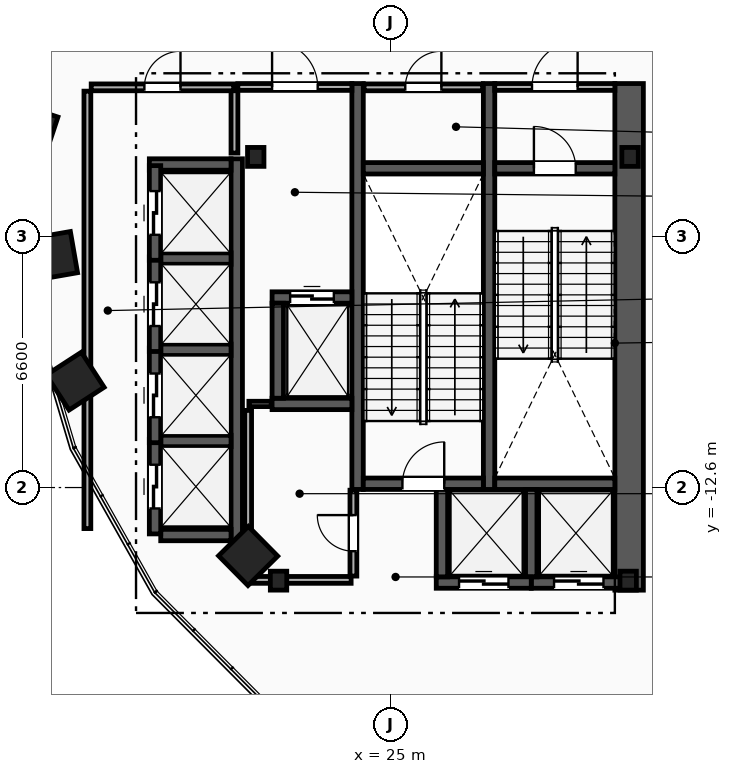
"""IFC4 building model, lengths in metres.
Left out: names, types, materials, properties, quantities, classifications, styles, units other than length and angle.
Written with IfcOpenShell. Run it as: python <this file> out.ifc"""

import sys

from ifc_helpers import new_model, si_unit, direction, frame, frame_2d, origin, origin_2d, place, context, subcontext, project, spatial, rectangle, i_section, extrude, element, fill, save


model = new_model("IFC4")
c1 = context("Model", 3, precision=1e-05, world=origin(), true_north=direction((0.0, 1.0)))
c2 = subcontext(c1, "Body", "Model", "MODEL_VIEW")
j1 = project(units=[si_unit("LENGTHUNIT", "METRE"), si_unit("PLANEANGLEUNIT", "RADIAN")], contexts=[c1])
p1 = place(None, origin())
s1 = spatial("IfcSite", under=j1, at=p1, CompositionType="ELEMENT")
p2 = place(p1, origin())
s2 = spatial("IfcBuilding", under=s1, at=p2, CompositionType="ELEMENT")
p3 = place(p2, frame((0.0, 0.0, 132.2)))
s3 = spatial("IfcBuildingStorey", under=s2, at=p3, CompositionType="ELEMENT", Elevation=132.2)
for number, where, z_axis, x_axis in (
    (1, (31.3, -3.9, 0.0), (0.0, 0.0, 1.0), (1.0, 0.0, 0.0)),
    (2, (21.45, -3.9, 0.0), (0.0, 0.0, 1.0), (1.0, 0.0, 0.0)),
    (3, (22.05, -15.05, 0.0), (0.0, 0.0, 1.0), (1.0, 0.0, 0.0)),
    (4, (31.25, -15.05, 0.0), (0.0, 0.0, 1.0), (1.0, 0.0, 0.0)),
):
    element("IfcColumn", number, at=place(p3, frame(where, z_axis=z_axis, x_axis=x_axis)), inside=s3, PredefinedType="COLUMN", context=c2, shape_type="SweptSolid", body=[
        extrude(i_section(OverallWidth=0.432, OverallDepth=0.498, WebThickness=0.056, FlangeThickness=0.089, FilletRadius=0.018, at=origin_2d()), origin(), (0.0, 0.0, 1.0), 4.6),
    ])
for number, where, z_axis, x_axis in (
    (5, (15.55, -3.2, 0.0), (0.0, 0.0, 1.0), (-0.315, -0.949, 0.0)),
    (6, (16.125, -6.5, 0.0), (0.0, 0.0, 1.0), (0.172, -0.985, 0.0)),
    (7, (16.7, -9.8, 0.0), (0.0, 0.0, 1.0), (0.544, -0.839, 0.0)),
    (8, (21.25, -14.4, 0.0), (0.0, 0.0, 1.0), (0.703, -0.711, 0.0)),
):
    element("IfcColumn", number, at=place(p3, frame(where, z_axis=z_axis, x_axis=x_axis)), inside=s3, PredefinedType="COLUMN", context=c2, shape_type="SweptSolid", body=[
        extrude(rectangle(XDim=1.1, YDim=1.1, at=origin_2d()), origin(), (0.0, 0.0, 1.0), 4.6),
    ])
p4 = place(p3, frame((31.275, -15.3, 0.0), z_axis=(0.0, 0.0, 1.0), x_axis=(0.0, 1.0, 0.0)))
e9 = element("IfcWall", 9, at=p4, inside=s3, PredefinedType="SHEAR", context=c2, shape_type="SweptSolid", body=[
    extrude(rectangle(XDim=13.33, YDim=0.75, at=frame_2d((6.665, 0.0))), origin(), (0.0, 0.0, 1.0), 4.36),
])
for number, where, z_axis, x_axis in (
    (10, (27.59, -12.65, 0.0), (0.0, 0.0, 1.0), (0.0, 1.0, 0.0)),
    (11, (24.13, -12.65, 0.0), (0.0, 0.0, 1.0), (0.0, 1.0, 0.0)),
):
    element("IfcWall", number, at=place(p3, frame(where, z_axis=z_axis, x_axis=x_axis)), inside=s3, PredefinedType="SHEAR", context=c2, shape_type="SweptSolid", body=[
        extrude(rectangle(XDim=10.68, YDim=0.3, at=frame_2d((5.34, 0.0))), origin(), (0.0, 0.0, 1.0), 4.36),
    ])
p5 = place(p3, frame((27.74, -4.2, 0.0), z_axis=(0.0, 0.0, 1.0), x_axis=(1.0, 0.0, 0.0)))
e12 = element("IfcWall", 12, at=p5, inside=s3, PredefinedType="SHEAR", context=c2, shape_type="SweptSolid", body=[
    extrude(rectangle(XDim=3.16, YDim=0.3, at=frame_2d((1.58, 0.0))), origin(), (0.0, 0.0, 1.0), 4.36),
])
p6 = place(p5, frame((1.03, 0.0, 0.0)))
e13 = element("IfcOpeningElement", 13, at=p6, cuts=e12, PredefinedType="OPENING", context=c2, shape_type="SweptSolid", body=[
    extrude(rectangle(XDim=1.1, YDim=2.15, at=frame_2d((0.55, 1.075))), frame((0.0, 0.16, 0.0), z_axis=(0.0, -1.0, 0.0), x_axis=(1.0, 0.0, 0.0)), (0.0, 0.0, 1.0), 0.32),
])
p7 = place(p3, frame((27.74, -12.5, 0.0), z_axis=(0.0, 0.0, 1.0), x_axis=(1.0, 0.0, 0.0)))
e14 = element("IfcWall", 14, at=p7, inside=s3, PredefinedType="SHEAR", context=c2, shape_type="SweptSolid", body=[
    extrude(rectangle(XDim=3.16, YDim=0.3, at=frame_2d((1.58, 0.0))), origin(), (0.0, 0.0, 1.0), 4.36),
])
p8 = place(p3, frame((24.28, -12.5, 0.0), z_axis=(0.0, 0.0, 1.0), x_axis=(1.0, 0.0, 0.0)))
e15 = element("IfcWall", 15, at=p8, inside=s3, PredefinedType="SHEAR", context=c2, shape_type="SweptSolid", body=[
    extrude(rectangle(XDim=3.16, YDim=0.3, at=frame_2d((1.58, 0.0))), origin(), (0.0, 0.0, 1.0), 4.36),
])
p9 = place(p8, frame((1.03, 0.0, 0.0)))
e16 = element("IfcOpeningElement", 16, at=p9, cuts=e15, PredefinedType="OPENING", context=c2, shape_type="SweptSolid", body=[
    extrude(rectangle(XDim=1.1, YDim=2.15, at=frame_2d((0.55, 1.075))), frame((0.0, 0.16, 0.0), z_axis=(0.0, -1.0, 0.0), x_axis=(1.0, 0.0, 0.0)), (0.0, 0.0, 1.0), 0.32),
])
p10 = place(p3, frame((24.28, -4.2, 0.0), z_axis=(0.0, 0.0, 1.0), x_axis=(1.0, 0.0, 0.0)))
e17 = element("IfcWall", 17, at=p10, inside=s3, PredefinedType="SHEAR", context=c2, shape_type="SweptSolid", body=[
    extrude(rectangle(XDim=3.16, YDim=0.3, at=frame_2d((1.58, 0.0))), origin(), (0.0, 0.0, 1.0), 4.36),
])
p11 = place(p3, frame((20.89, -3.8, 0.0), z_axis=(0.0, 0.0, 1.0), x_axis=(0.0, 1.0, 0.0)))
e18 = element("IfcWall", 18, at=p11, inside=s3, PredefinedType="PARTITIONING", context=c2, shape_type="SweptSolid", body=[
    extrude(rectangle(XDim=1.65, YDim=0.18, at=frame_2d((0.825, 0.0))), origin(), (0.0, 0.0, 1.0), 4.36),
])
p12 = place(p3, frame((20.98, -2.06, 0.0), z_axis=(0.0, 0.0, 1.0), x_axis=(1.0, 0.0, 0.0)))
e19 = element("IfcWall", 19, at=p12, inside=s3, PredefinedType="PARTITIONING", context=c2, shape_type="SweptSolid", body=[
    extrude(rectangle(XDim=3.0, YDim=0.18, at=frame_2d((1.5, 0.0))), origin(), (0.0, 0.0, 1.0), 4.36),
])
p13 = place(p12, frame((0.9, 0.0, 0.0)))
e20 = element("IfcOpeningElement", 20, at=p13, cuts=e19, PredefinedType="OPENING", context=c2, shape_type="SweptSolid", body=[
    extrude(rectangle(XDim=1.2, YDim=2.15, at=frame_2d((0.6, 1.075))), frame((0.0, 0.1, 0.0), z_axis=(0.0, -1.0, 0.0), x_axis=(1.0, 0.0, 0.0)), (0.0, 0.0, 1.0), 0.2),
])
p14 = place(p3, frame((27.74, -2.06, 0.0), z_axis=(0.0, 0.0, 1.0), x_axis=(1.0, 0.0, 0.0)))
e21 = element("IfcWall", 21, at=p14, inside=s3, PredefinedType="PARTITIONING", context=c2, shape_type="SweptSolid", body=[
    extrude(rectangle(XDim=3.16, YDim=0.18, at=frame_2d((1.58, 0.0))), origin(), (0.0, 0.0, 1.0), 4.36),
])
p15 = place(p14, frame((0.98, 0.0, 0.0)))
e22 = element("IfcOpeningElement", 22, at=p15, cuts=e21, PredefinedType="OPENING", context=c2, shape_type="SweptSolid", body=[
    extrude(rectangle(XDim=1.2, YDim=2.15, at=frame_2d((0.6, 1.075))), frame((0.0, 0.1, 0.0), z_axis=(0.0, -1.0, 0.0), x_axis=(1.0, 0.0, 0.0)), (0.0, 0.0, 1.0), 0.2),
])
p16 = place(p3, frame((21.88, -7.6, 0.0), z_axis=(0.0, 0.0, 1.0), x_axis=(1.0, 0.0, 0.0)))
e23 = element("IfcWall", 23, at=p16, inside=s3, PredefinedType="SHEAR", context=c2, shape_type="SweptSolid", body=[
    extrude(rectangle(XDim=2.1, YDim=0.3, at=frame_2d((1.05, 0.0))), origin(), (0.0, 0.0, 1.0), 4.36),
])
p17 = place(p16, frame((0.475, 0.0, 0.0)))
e24 = element("IfcOpeningElement", 24, at=p17, cuts=e23, PredefinedType="OPENING", context=c2, shape_type="SweptSolid", body=[
    extrude(rectangle(XDim=1.15, YDim=2.2, at=frame_2d((0.575, 1.1))), frame((0.0, 0.16, 0.0), z_axis=(0.0, -1.0, 0.0), x_axis=(1.0, 0.0, 0.0)), (0.0, 0.0, 1.0), 0.32),
])
p18 = place(p3, frame((21.88, -10.4, 0.0), z_axis=(0.0, 0.0, 1.0), x_axis=(1.0, 0.0, 0.0)))
e25 = element("IfcWall", 25, at=p18, inside=s3, PredefinedType="SHEAR", context=c2, shape_type="SweptSolid", body=[
    extrude(rectangle(XDim=2.1, YDim=0.3, at=frame_2d((1.05, 0.0))), origin(), (0.0, 0.0, 1.0), 4.36),
])
p19 = place(p3, frame((22.03, -10.25, 0.0), z_axis=(0.0, 0.0, 1.0), x_axis=(0.0, 1.0, 0.0)))
e26 = element("IfcWall", 26, at=p19, inside=s3, PredefinedType="SHEAR", context=c2, shape_type="SweptSolid", body=[
    extrude(rectangle(XDim=2.5, YDim=0.3, at=frame_2d((1.25, 0.0))), origin(), (0.0, 0.0, 1.0), 4.36),
])
p20 = place(p3, frame((28.7, -15.1, 0.0), z_axis=(0.0, 0.0, 1.0), x_axis=(1.0, 0.0, 0.0)))
e27 = element("IfcWall", 27, at=p20, inside=s3, PredefinedType="SHEAR", context=c2, shape_type="SweptSolid", body=[
    extrude(rectangle(XDim=2.5, YDim=0.3, at=frame_2d((1.25, 0.0))), origin(), (0.0, 0.0, 1.0), 4.36),
])
p21 = place(p20, frame((0.6, 0.0, 0.0)))
e28 = element("IfcOpeningElement", 28, at=p21, cuts=e27, PredefinedType="OPENING", context=c2, shape_type="SweptSolid", body=[
    extrude(rectangle(XDim=1.3, YDim=2.2, at=frame_2d((0.65, 1.1))), frame((0.0, 0.16, 0.0), z_axis=(0.0, -1.0, 0.0), x_axis=(1.0, 0.0, 0.0)), (0.0, 0.0, 1.0), 0.32),
])
p22 = place(p3, frame((28.7, -14.95, 0.0), z_axis=(0.0, 0.0, 1.0), x_axis=(0.0, 1.0, 0.0)))
e29 = element("IfcWall", 29, at=p22, inside=s3, PredefinedType="SHEAR", context=c2, shape_type="SweptSolid", body=[
    extrude(rectangle(XDim=2.3, YDim=0.3, at=frame_2d((1.15, 0.0))), origin(), (0.0, 0.0, 1.0), 4.36),
])
p23 = place(p3, frame((26.2, -15.1, 0.0), z_axis=(0.0, 0.0, 1.0), x_axis=(1.0, 0.0, 0.0)))
e30 = element("IfcWall", 30, at=p23, inside=s3, PredefinedType="SHEAR", context=c2, shape_type="SweptSolid", body=[
    extrude(rectangle(XDim=2.5, YDim=0.3, at=frame_2d((1.25, 0.0))), origin(), (0.0, 0.0, 1.0), 4.36),
])
p24 = place(p23, frame((0.6, 0.0, 0.0)))
e31 = element("IfcOpeningElement", 31, at=p24, cuts=e30, PredefinedType="OPENING", context=c2, shape_type="SweptSolid", body=[
    extrude(rectangle(XDim=1.3, YDim=2.2, at=frame_2d((0.65, 1.1))), frame((0.0, 0.16, 0.0), z_axis=(0.0, -1.0, 0.0), x_axis=(1.0, 0.0, 0.0)), (0.0, 0.0, 1.0), 0.32),
])
p25 = place(p3, frame((26.35, -14.95, 0.0), z_axis=(0.0, 0.0, 1.0), x_axis=(0.0, 1.0, 0.0)))
e32 = element("IfcWall", 32, at=p25, inside=s3, PredefinedType="SHEAR", context=c2, shape_type="SweptSolid", body=[
    extrude(rectangle(XDim=2.3, YDim=0.3, at=frame_2d((1.15, 0.0))), origin(), (0.0, 0.0, 1.0), 4.36),
])
p26 = place(p3, frame((20.95, -14.0, 0.0), z_axis=(0.0, 0.0, 1.0), x_axis=(0.0, 1.0, 0.0)))
e33 = element("IfcWall", 33, at=p26, inside=s3, PredefinedType="SHEAR", context=c2, shape_type="SweptSolid", body=[
    extrude(rectangle(XDim=10.05, YDim=0.3, at=frame_2d((5.025, 0.0))), origin(), (0.0, 0.0, 1.0), 4.36),
])
p27 = place(p3, frame((18.95, -13.85, 0.0), z_axis=(0.0, 0.0, 1.0), x_axis=(1.0, 0.0, 0.0)))
e34 = element("IfcWall", 34, at=p27, inside=s3, PredefinedType="SHEAR", context=c2, shape_type="SweptSolid", body=[
    extrude(rectangle(XDim=1.85, YDim=0.3, at=frame_2d((0.925, 0.0))), origin(), (0.0, 0.0, 1.0), 4.36),
])
p28 = place(p3, frame((18.65, -4.1, 0.0), z_axis=(0.0, 0.0, 1.0), x_axis=(1.0, 0.0, 0.0)))
e35 = element("IfcWall", 35, at=p28, inside=s3, PredefinedType="SHEAR", context=c2, shape_type="SweptSolid", body=[
    extrude(rectangle(XDim=2.15, YDim=0.3, at=frame_2d((1.075, 0.0))), origin(), (0.0, 0.0, 1.0), 4.36),
])
for number, where, z_axis, x_axis in (
    (36, (18.95, -11.375, 0.0), (0.0, 0.0, 1.0), (1.0, 0.0, 0.0)),
    (37, (18.95, -8.975, 0.0), (0.0, 0.0, 1.0), (1.0, 0.0, 0.0)),
    (38, (18.95, -6.575, 0.0), (0.0, 0.0, 1.0), (1.0, 0.0, 0.0)),
):
    element("IfcWall", number, at=place(p3, frame(where, z_axis=z_axis, x_axis=x_axis)), inside=s3, PredefinedType="SHEAR", context=c2, shape_type="SweptSolid", body=[
        extrude(rectangle(XDim=1.85, YDim=0.3, at=frame_2d((0.925, 0.0))), origin(), (0.0, 0.0, 1.0), 4.36),
    ])
p29 = place(p3, frame((18.8, -13.82, 0.0), z_axis=(0.0, 0.0, 1.0), x_axis=(0.0, 1.0, 0.0)))
e39 = element("IfcWall", 39, at=p29, inside=s3, PredefinedType="SHEAR", context=c2, shape_type="SweptSolid", body=[
    extrude(rectangle(XDim=2.49, YDim=0.3, at=frame_2d((1.245, 0.0))), origin(), (0.0, 0.0, 1.0), 4.36),
])
p30 = place(p29, frame((0.67, 0.0, 0.0)))
e40 = element("IfcOpeningElement", 40, at=p30, cuts=e39, PredefinedType="OPENING", context=c2, shape_type="SweptSolid", body=[
    extrude(rectangle(XDim=1.15, YDim=2.2, at=frame_2d((0.575, 1.1))), frame((0.0, 0.16, 0.0), z_axis=(0.0, -1.0, 0.0), x_axis=(1.0, 0.0, 0.0)), (0.0, 0.0, 1.0), 0.32),
])
p31 = place(p3, frame((18.8, -11.42, 0.0), z_axis=(0.0, 0.0, 1.0), x_axis=(0.0, 1.0, 0.0)))
e41 = element("IfcWall", 41, at=p31, inside=s3, PredefinedType="SHEAR", context=c2, shape_type="SweptSolid", body=[
    extrude(rectangle(XDim=2.49, YDim=0.3, at=frame_2d((1.245, 0.0))), origin(), (0.0, 0.0, 1.0), 4.36),
])
p32 = place(p31, frame((0.67, 0.0, 0.0)))
e42 = element("IfcOpeningElement", 42, at=p32, cuts=e41, PredefinedType="OPENING", context=c2, shape_type="SweptSolid", body=[
    extrude(rectangle(XDim=1.15, YDim=2.2, at=frame_2d((0.575, 1.1))), frame((0.0, 0.16, 0.0), z_axis=(0.0, -1.0, 0.0), x_axis=(1.0, 0.0, 0.0)), (0.0, 0.0, 1.0), 0.32),
])
p33 = place(p3, frame((18.8, -9.02, 0.0), z_axis=(0.0, 0.0, 1.0), x_axis=(0.0, 1.0, 0.0)))
e43 = element("IfcWall", 43, at=p33, inside=s3, PredefinedType="SHEAR", context=c2, shape_type="SweptSolid", body=[
    extrude(rectangle(XDim=2.49, YDim=0.3, at=frame_2d((1.245, 0.0))), origin(), (0.0, 0.0, 1.0), 4.36),
])
p34 = place(p33, frame((0.67, 0.0, 0.0)))
e44 = element("IfcOpeningElement", 44, at=p34, cuts=e43, PredefinedType="OPENING", context=c2, shape_type="SweptSolid", body=[
    extrude(rectangle(XDim=1.15, YDim=2.2, at=frame_2d((0.575, 1.1))), frame((0.0, 0.16, 0.0), z_axis=(0.0, -1.0, 0.0), x_axis=(1.0, 0.0, 0.0)), (0.0, 0.0, 1.0), 0.32),
])
p35 = place(p3, frame((18.8, -6.62, 0.0), z_axis=(0.0, 0.0, 1.0), x_axis=(0.0, 1.0, 0.0)))
e45 = element("IfcWall", 45, at=p35, inside=s3, PredefinedType="SHEAR", context=c2, shape_type="SweptSolid", body=[
    extrude(rectangle(XDim=2.49, YDim=0.3, at=frame_2d((1.245, 0.0))), origin(), (0.0, 0.0, 1.0), 4.36),
])
p36 = place(p35, frame((0.67, 0.0, 0.0)))
e46 = element("IfcOpeningElement", 46, at=p36, cuts=e45, PredefinedType="OPENING", context=c2, shape_type="SweptSolid", body=[
    extrude(rectangle(XDim=1.15, YDim=2.2, at=frame_2d((0.575, 1.1))), frame((0.0, 0.16, 0.0), z_axis=(0.0, -1.0, 0.0), x_axis=(1.0, 0.0, 0.0)), (0.0, 0.0, 1.0), 0.32),
])
p37 = place(p3, frame((17.02, -13.68, 0.0), z_axis=(0.0, 0.0, 1.0), x_axis=(0.0, 1.0, 0.0)))
e47 = element("IfcWall", 47, at=p37, inside=s3, PredefinedType="PARTITIONING", context=c2, shape_type="SweptSolid", body=[
    extrude(rectangle(XDim=11.51, YDim=0.18, at=frame_2d((5.755, 0.0))), origin(), (0.0, 0.0, 1.0), 4.36),
])
p38 = place(p3, frame((17.12, -2.07, 0.0), z_axis=(0.0, 0.0, 1.0), x_axis=(1.0, 0.0, 0.0)))
e48 = element("IfcWall", 48, at=p38, inside=s3, PredefinedType="PARTITIONING", context=c2, shape_type="SweptSolid", body=[
    extrude(rectangle(XDim=3.75, YDim=0.18, at=frame_2d((1.875, 0.0))), origin(), (0.0, 0.0, 1.0), 4.36),
])
p39 = place(p38, frame((1.4, 0.0, 0.0)))
e49 = element("IfcOpeningElement", 49, at=p39, cuts=e48, PredefinedType="OPENING", context=c2, shape_type="SweptSolid", body=[
    extrude(rectangle(XDim=0.95, YDim=2.1, at=frame_2d((0.475, 1.05))), frame((0.0, 0.1, 0.0), z_axis=(0.0, -1.0, 0.0), x_axis=(1.0, 0.0, 0.0)), (0.0, 0.0, 1.0), 0.2),
])
p40 = place(p3, frame((21.27, -10.4, 0.0), z_axis=(0.0, 0.0, 1.0), x_axis=(1.0, 0.0, 0.0)))
e50 = element("IfcWall", 50, at=p40, inside=s3, PredefinedType="PARTITIONING", context=c2, shape_type="SweptSolid", body=[
    extrude(rectangle(XDim=0.59, YDim=0.14, at=frame_2d((0.295, 0.0))), origin(), (0.0, 0.0, 1.0), 4.36),
])
p41 = place(p3, frame((21.25, -14.93, 0.0), z_axis=(0.0, 0.0, 1.0), x_axis=(0.0, 1.0, 0.0)))
e51 = element("IfcWall", 51, at=p41, inside=s3, PredefinedType="PARTITIONING", context=c2, shape_type="SweptSolid", body=[
    extrude(rectangle(XDim=4.36, YDim=0.18, at=frame_2d((2.18, 0.0))), origin(), (0.0, 0.0, 1.0), 4.36),
])
p42 = place(p3, frame((21.35, -15.03, 0.0), z_axis=(0.0, 0.0, 1.0), x_axis=(1.0, 0.0, 0.0)))
e52 = element("IfcWall", 52, at=p42, inside=s3, PredefinedType="PARTITIONING", context=c2, shape_type="SweptSolid", body=[
    extrude(rectangle(XDim=2.61, YDim=0.18, at=frame_2d((1.305, 0.0))), origin(), (0.0, 0.0, 1.0), 3.433),
])
p43 = place(p3, frame((24.3, -2.07, 0.0), z_axis=(0.0, 0.0, 1.0), x_axis=(1.0, 0.0, 0.0)))
e53 = element("IfcWall", 53, at=p43, inside=s3, PredefinedType="PARTITIONING", context=c2, shape_type="SweptSolid", body=[
    extrude(rectangle(XDim=3.12, YDim=0.18, at=frame_2d((1.56, 0.0))), origin(), (0.0, 0.0, 1.0), 4.36),
])
p44 = place(p43, frame((1.085, 0.0, 0.0)))
e54 = element("IfcOpeningElement", 54, at=p44, cuts=e53, PredefinedType="OPENING", context=c2, shape_type="SweptSolid", body=[
    extrude(rectangle(XDim=0.95, YDim=2.1, at=frame_2d((0.475, 1.05))), frame((0.0, 0.1, 0.0), z_axis=(0.0, -1.0, 0.0), x_axis=(1.0, 0.0, 0.0)), (0.0, 0.0, 1.0), 0.2),
])
p45 = place(p3, frame((24.02, -14.93, 0.0), z_axis=(0.0, 0.0, 1.0), x_axis=(0.0, 1.0, 0.0)))
e55 = element("IfcWall", 55, at=p45, inside=s3, PredefinedType="PARTITIONING", context=c2, shape_type="SweptSolid", body=[
    extrude(rectangle(XDim=2.26, YDim=0.18, at=frame_2d((1.13, 0.0))), origin(), (0.0, 0.0, 1.0), 4.36),
])
p46 = place(p45, frame((0.655, 0.0, 0.0)))
e56 = element("IfcOpeningElement", 56, at=p46, cuts=e55, PredefinedType="OPENING", context=c2, shape_type="SweptSolid", body=[
    extrude(rectangle(XDim=0.95, YDim=2.1, at=frame_2d((0.475, 1.05))), frame((0.0, 0.1, 0.0), z_axis=(0.0, -1.0, 0.0), x_axis=(1.0, 0.0, 0.0)), (0.0, 0.0, 1.0), 0.2),
])
p47 = place(p6, origin())
e57 = element("IfcDoor", 57, at=p47, inside=s3, OperationType="SINGLE_SWING_LEFT", PredefinedType="DOOR", context=c2, shape_type="SweptSolid", body=[
    extrude(rectangle(XDim=1.1, YDim=2.15, at=frame_2d((0.55, 1.075))), frame((0.0, 0.025, 0.0), z_axis=(0.0, -1.0, 0.0), x_axis=(1.0, 0.0, 0.0)), (0.0, 0.0, 1.0), 0.05),
])
fill(e13, e57)
p48 = place(p9, origin())
e58 = element("IfcDoor", 58, at=p48, inside=s3, OperationType="SINGLE_SWING_RIGHT", PredefinedType="DOOR", context=c2, shape_type="SweptSolid", body=[
    extrude(rectangle(XDim=1.1, YDim=2.15, at=frame_2d((0.55, 1.075))), frame((0.0, 0.025, 0.0), z_axis=(0.0, -1.0, 0.0), x_axis=(1.0, 0.0, 0.0)), (0.0, 0.0, 1.0), 0.05),
])
fill(e16, e58)
p49 = place(p13, origin())
e59 = element("IfcDoor", 59, at=p49, inside=s3, OperationType="SINGLE_SWING_LEFT", PredefinedType="DOOR", context=c2, shape_type="SweptSolid", body=[
    extrude(rectangle(XDim=1.2, YDim=2.15, at=frame_2d((0.6, 1.075))), frame((0.0, 0.025, 0.0), z_axis=(0.0, -1.0, 0.0), x_axis=(1.0, 0.0, 0.0)), (0.0, 0.0, 1.0), 0.05),
])
fill(e20, e59)
p50 = place(p15, origin())
e60 = element("IfcDoor", 60, at=p50, inside=s3, OperationType="SINGLE_SWING_RIGHT", PredefinedType="DOOR", context=c2, shape_type="SweptSolid", body=[
    extrude(rectangle(XDim=1.2, YDim=2.15, at=frame_2d((0.6, 1.075))), frame((0.0, 0.025, 0.0), z_axis=(0.0, -1.0, 0.0), x_axis=(1.0, 0.0, 0.0)), (0.0, 0.0, 1.0), 0.05),
])
fill(e22, e60)
p51 = place(p17, origin())
e61 = element("IfcDoor", 61, at=p51, inside=s3, OperationType="SLIDING_TO_LEFT", PredefinedType="TRAPDOOR", context=c2, shape_type="SweptSolid", body=[
    extrude(rectangle(XDim=1.15, YDim=2.2, at=frame_2d((0.575, 1.1))), frame((0.0, 0.025, 0.0), z_axis=(0.0, -1.0, 0.0), x_axis=(1.0, 0.0, 0.0)), (0.0, 0.0, 1.0), 0.05),
])
fill(e24, e61)
p52 = place(p21, origin())
e62 = element("IfcDoor", 62, at=p52, inside=s3, OperationType="SLIDING_TO_LEFT", PredefinedType="TRAPDOOR", context=c2, shape_type="SweptSolid", body=[
    extrude(rectangle(XDim=1.3, YDim=2.2, at=frame_2d((0.65, 1.1))), frame((0.0, 0.025, 0.0), z_axis=(0.0, -1.0, 0.0), x_axis=(1.0, 0.0, 0.0)), (0.0, 0.0, 1.0), 0.05),
])
fill(e28, e62)
p53 = place(p24, origin())
e63 = element("IfcDoor", 63, at=p53, inside=s3, OperationType="SLIDING_TO_LEFT", PredefinedType="TRAPDOOR", context=c2, shape_type="SweptSolid", body=[
    extrude(rectangle(XDim=1.3, YDim=2.2, at=frame_2d((0.65, 1.1))), frame((0.0, 0.025, 0.0), z_axis=(0.0, -1.0, 0.0), x_axis=(1.0, 0.0, 0.0)), (0.0, 0.0, 1.0), 0.05),
])
fill(e31, e63)
p54 = place(p30, origin())
e64 = element("IfcDoor", 64, at=p54, inside=s3, OperationType="SLIDING_TO_LEFT", PredefinedType="TRAPDOOR", context=c2, shape_type="SweptSolid", body=[
    extrude(rectangle(XDim=1.15, YDim=2.2, at=frame_2d((0.575, 1.1))), frame((0.0, 0.025, 0.0), z_axis=(0.0, -1.0, 0.0), x_axis=(1.0, 0.0, 0.0)), (0.0, 0.0, 1.0), 0.05),
])
fill(e40, e64)
p55 = place(p32, origin())
e65 = element("IfcDoor", 65, at=p55, inside=s3, OperationType="SLIDING_TO_LEFT", PredefinedType="TRAPDOOR", context=c2, shape_type="SweptSolid", body=[
    extrude(rectangle(XDim=1.15, YDim=2.2, at=frame_2d((0.575, 1.1))), frame((0.0, 0.025, 0.0), z_axis=(0.0, -1.0, 0.0), x_axis=(1.0, 0.0, 0.0)), (0.0, 0.0, 1.0), 0.05),
])
fill(e42, e65)
p56 = place(p34, origin())
e66 = element("IfcDoor", 66, at=p56, inside=s3, OperationType="SLIDING_TO_LEFT", PredefinedType="TRAPDOOR", context=c2, shape_type="SweptSolid", body=[
    extrude(rectangle(XDim=1.15, YDim=2.2, at=frame_2d((0.575, 1.1))), frame((0.0, 0.025, 0.0), z_axis=(0.0, -1.0, 0.0), x_axis=(1.0, 0.0, 0.0)), (0.0, 0.0, 1.0), 0.05),
])
fill(e44, e66)
p57 = place(p36, origin())
e67 = element("IfcDoor", 67, at=p57, inside=s3, OperationType="SLIDING_TO_LEFT", PredefinedType="TRAPDOOR", context=c2, shape_type="SweptSolid", body=[
    extrude(rectangle(XDim=1.15, YDim=2.2, at=frame_2d((0.575, 1.1))), frame((0.0, 0.025, 0.0), z_axis=(0.0, -1.0, 0.0), x_axis=(1.0, 0.0, 0.0)), (0.0, 0.0, 1.0), 0.05),
])
fill(e46, e67)
p58 = place(p39, origin())
e68 = element("IfcDoor", 68, at=p58, inside=s3, OperationType="SINGLE_SWING_RIGHT", PredefinedType="DOOR", context=c2, shape_type="SweptSolid", body=[
    extrude(rectangle(XDim=0.95, YDim=2.1, at=frame_2d((0.475, 1.05))), frame((0.0, 0.025, 0.0), z_axis=(0.0, -1.0, 0.0), x_axis=(1.0, 0.0, 0.0)), (0.0, 0.0, 1.0), 0.05),
])
fill(e49, e68)
p59 = place(p44, origin())
e69 = element("IfcDoor", 69, at=p59, inside=s3, OperationType="SINGLE_SWING_RIGHT", PredefinedType="DOOR", context=c2, shape_type="SweptSolid", body=[
    extrude(rectangle(XDim=0.95, YDim=2.1, at=frame_2d((0.475, 1.05))), frame((0.0, 0.025, 0.0), z_axis=(0.0, -1.0, 0.0), x_axis=(1.0, 0.0, 0.0)), (0.0, 0.0, 1.0), 0.05),
])
fill(e54, e69)
p60 = place(p46, origin())
e70 = element("IfcDoor", 70, at=p60, inside=s3, OperationType="SINGLE_SWING_RIGHT", PredefinedType="DOOR", context=c2, shape_type="SweptSolid", body=[
    extrude(rectangle(XDim=0.95, YDim=2.1, at=frame_2d((0.475, 1.05))), frame((0.0, 0.025, 0.0), z_axis=(0.0, -1.0, 0.0), x_axis=(1.0, 0.0, 0.0)), (0.0, 0.0, 1.0), 0.05),
])
fill(e56, e70)
save(model, sys.argv[1])
